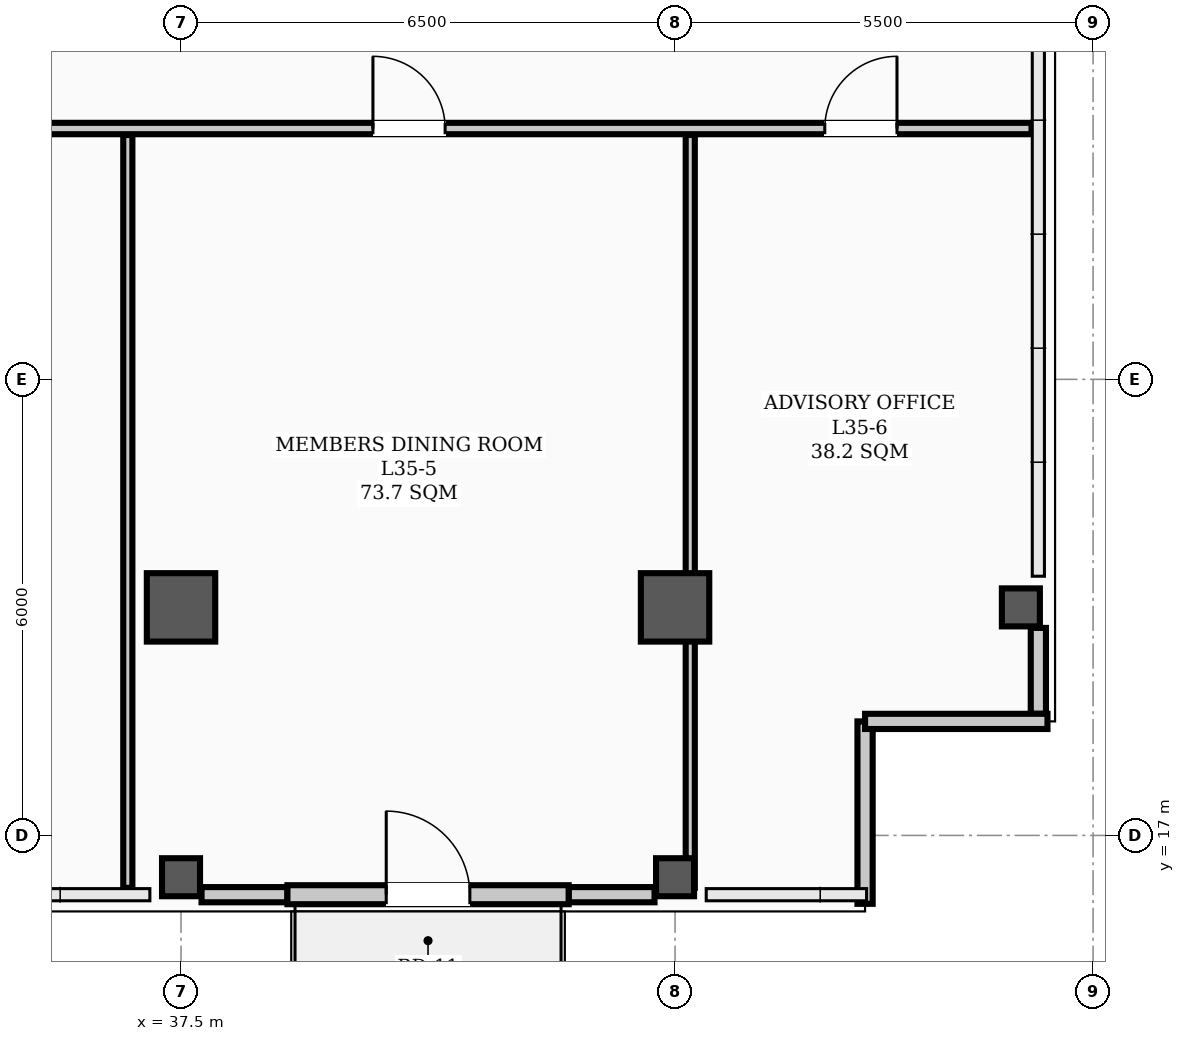
"""IFC4 building model, lengths in metres.
Left out: names, types, materials, properties, quantities, classifications, styles, units other than length and angle.
Written with IfcOpenShell. Run it as: python <this file> out.ifc"""

import sys

from ifc_helpers import new_model, si_unit, direction, frame, frame_2d, origin, origin_2d, place, context, subcontext, project, spatial, rectangle, hollow_rectangle, extrude, element, fill, save


model = new_model("IFC4")
c1 = context("Model", 3, precision=1e-05, world=origin(), true_north=direction((0.0, 1.0)))
c2 = subcontext(c1, "Body", "Model", "MODEL_VIEW")
j1 = project(units=[si_unit("LENGTHUNIT", "METRE"), si_unit("PLANEANGLEUNIT", "RADIAN")], contexts=[c1])
p1 = place(None, origin())
s1 = spatial("IfcSite", under=j1, at=p1, CompositionType="ELEMENT")
p2 = place(p1, origin())
s2 = spatial("IfcBuilding", under=s1, at=p2, CompositionType="ELEMENT")
p3 = place(p2, frame((0.0, 0.0, 142.2)))
s3 = spatial("IfcBuildingStorey", under=s2, at=p3, CompositionType="ELEMENT", Elevation=142.2)
for number, where, z_axis, x_axis in (
    (1, (37.5, 20.0, 0.0), (0.0, 0.0, 1.0), (1.0, 0.0, 0.0)),
    (2, (44.0, 20.0, 0.0), (0.0, 0.0, 1.0), (1.0, 0.0, 0.0)),
):
    element("IfcColumn", number, at=place(p3, frame(where, z_axis=z_axis, x_axis=x_axis)), inside=s3, PredefinedType="COLUMN", context=c2, shape_type="SweptSolid", body=[
        extrude(hollow_rectangle(XDim=0.9, YDim=0.9, WallThickness=0.035, InnerFilletRadius=0.017, OuterFilletRadius=0.052, at=origin_2d()), origin(), (0.0, 0.0, 1.0), 3.9),
    ])
for number, where, z_axis, x_axis in (
    (3, (37.5, 16.45, 0.0), (0.0, 0.0, 1.0), (1.0, 0.0, 0.0)),
    (4, (44.0, 16.45, 0.0), (0.0, 0.0, 1.0), (1.0, 0.0, 0.0)),
    (5, (48.55, 20.0, 0.0), (0.0, 0.0, 1.0), (1.0, 0.0, 0.0)),
):
    element("IfcColumn", number, at=place(p3, frame(where, z_axis=z_axis, x_axis=x_axis)), inside=s3, PredefinedType="COLUMN", context=c2, shape_type="SweptSolid", body=[
        extrude(hollow_rectangle(XDim=0.5, YDim=0.5, WallThickness=0.024, InnerFilletRadius=0.012, OuterFilletRadius=0.036, at=origin_2d()), origin(), (0.0, 0.0, 1.0), 3.9),
    ])
for number, where, z_axis, x_axis in (
    (6, (48.78, 18.6, 0.0), (0.0, 0.0, 1.0), (0.0, 1.0, 0.0)),
    (7, (37.77, 16.22, 0.0), (0.0, 0.0, 1.0), (1.0, 0.0, 0.0)),
    (8, (42.6, 16.22, 0.0), (0.0, 0.0, 1.0), (1.0, 0.0, 0.0)),
):
    element("IfcWall", number, at=place(p3, frame(where, z_axis=z_axis, x_axis=x_axis)), inside=s3, PredefinedType="PARAPET", context=c2, shape_type="SweptSolid", body=[
        extrude(rectangle(XDim=1.13, YDim=0.2, at=frame_2d((0.565, 0.0))), origin(), (0.0, 0.0, 1.0), 1.2),
    ])
for number, where, z_axis, x_axis in (
    (9, (46.5, 16.1, 0.0), (0.0, 0.0, 1.0), (0.0, 1.0, 0.0)),
    (10, (46.5, 18.5, 0.0), (0.0, 0.0, 1.0), (1.0, 0.0, 0.0)),
):
    element("IfcWall", number, at=place(p3, frame(where, z_axis=z_axis, x_axis=x_axis)), inside=s3, PredefinedType="PARAPET", context=c2, shape_type="SweptSolid", body=[
        extrude(rectangle(XDim=2.4, YDim=0.2, at=frame_2d((1.2, 0.0))), origin(), (0.0, 0.0, 1.0), 1.2),
    ])
p4 = place(p3, frame((38.9, 16.22, 0.0), z_axis=(0.0, 0.0, 1.0), x_axis=(1.0, 0.0, 0.0)))
e11 = element("IfcWall", 11, at=p4, inside=s3, PredefinedType="STANDARD", context=c2, shape_type="SweptSolid", body=[
    extrude(rectangle(XDim=3.7, YDim=0.25, at=frame_2d((1.85, 0.0))), origin(), (0.0, 0.0, 1.0), 3.18),
])
p5 = place(p4, frame((1.3, 0.0, 0.0)))
e12 = element("IfcOpeningElement", 12, at=p5, cuts=e11, PredefinedType="OPENING", context=c2, shape_type="SweptSolid", body=[
    extrude(rectangle(XDim=1.1, YDim=2.2, at=frame_2d((0.55, 1.1))), frame((0.0, 0.135, 0.0), z_axis=(0.0, -1.0, 0.0), x_axis=(1.0, 0.0, 0.0)), (0.0, 0.0, 1.0), 0.27),
])
p6 = place(p3, frame((2.31, 26.3, 0.0), z_axis=(0.0, 0.0, 1.0), x_axis=(1.0, 0.0, 0.0)))
e13 = element("IfcWall", 13, at=p6, inside=s3, PredefinedType="PARTITIONING", context=c2, shape_type="SweptSolid", body=[
    extrude(rectangle(XDim=46.38, YDim=0.15, at=frame_2d((23.19, 0.0))), origin(), (0.0, 0.0, 1.0), 3.1),
])
p7 = place(p6, frame((9.39, 0.0, 0.0)))
e14 = element("IfcOpeningElement", 14, at=p7, cuts=e13, PredefinedType="OPENING", context=c2, shape_type="SweptSolid", body=[
    extrude(rectangle(XDim=0.95, YDim=2.08, at=frame_2d((0.475, 1.04))), frame((0.0, 0.085, 0.0), z_axis=(0.0, -1.0, 0.0), x_axis=(1.0, 0.0, 0.0)), (0.0, 0.0, 1.0), 0.17),
])
p8 = place(p6, frame((14.215, 0.0, 0.0)))
e15 = element("IfcOpeningElement", 15, at=p8, cuts=e13, PredefinedType="OPENING", context=c2, shape_type="SweptSolid", body=[
    extrude(rectangle(XDim=0.95, YDim=2.08, at=frame_2d((0.475, 1.04))), frame((0.0, 0.085, 0.0), z_axis=(0.0, -1.0, 0.0), x_axis=(1.0, 0.0, 0.0)), (0.0, 0.0, 1.0), 0.17),
])
p9 = place(p6, frame((19.115, 0.0, 0.0)))
e16 = element("IfcOpeningElement", 16, at=p9, cuts=e13, PredefinedType="OPENING", context=c2, shape_type="SweptSolid", body=[
    extrude(rectangle(XDim=0.95, YDim=2.08, at=frame_2d((0.475, 1.04))), frame((0.0, 0.085, 0.0), z_axis=(0.0, -1.0, 0.0), x_axis=(1.0, 0.0, 0.0)), (0.0, 0.0, 1.0), 0.17),
])
p10 = place(p6, frame((23.065, 0.0, 0.0)))
e17 = element("IfcOpeningElement", 17, at=p10, cuts=e13, PredefinedType="OPENING", context=c2, shape_type="SweptSolid", body=[
    extrude(rectangle(XDim=0.95, YDim=2.08, at=frame_2d((0.475, 1.04))), frame((0.0, 0.085, 0.0), z_axis=(0.0, -1.0, 0.0), x_axis=(1.0, 0.0, 0.0)), (0.0, 0.0, 1.0), 0.17),
])
p11 = place(p6, frame((37.715, 0.0, 0.0)))
e18 = element("IfcOpeningElement", 18, at=p11, cuts=e13, PredefinedType="OPENING", context=c2, shape_type="SweptSolid", body=[
    extrude(rectangle(XDim=0.95, YDim=2.08, at=frame_2d((0.475, 1.04))), frame((0.0, 0.085, 0.0), z_axis=(0.0, -1.0, 0.0), x_axis=(1.0, 0.0, 0.0)), (0.0, 0.0, 1.0), 0.17),
])
p12 = place(p6, frame((43.66, 0.0, 0.0)))
e19 = element("IfcOpeningElement", 19, at=p12, cuts=e13, PredefinedType="OPENING", context=c2, shape_type="SweptSolid", body=[
    extrude(rectangle(XDim=0.95, YDim=2.08, at=frame_2d((0.475, 1.04))), frame((0.0, 0.085, 0.0), z_axis=(0.0, -1.0, 0.0), x_axis=(1.0, 0.0, 0.0)), (0.0, 0.0, 1.0), 0.17),
])
for number, where, z_axis, x_axis in (
    (20, (36.8, 16.31, 0.0), (0.0, 0.0, 1.0), (0.0, 1.0, 0.0)),
    (21, (44.2, 16.31, 0.0), (0.0, 0.0, 1.0), (0.0, 1.0, 0.0)),
):
    element("IfcWall", number, at=place(p3, frame(where, z_axis=z_axis, x_axis=x_axis)), inside=s3, PredefinedType="PARTITIONING", context=c2, shape_type="SweptSolid", body=[
        extrude(rectangle(XDim=9.905, YDim=0.12, at=frame_2d((4.953, 0.0))), origin(), (0.0, 0.0, 1.0), 3.0),
    ])
p13 = place(p5, origin())
e22 = element("IfcDoor", 22, at=p13, inside=s3, OperationType="SINGLE_SWING_LEFT", PredefinedType="DOOR", context=c2, shape_type="SweptSolid", body=[
    extrude(rectangle(XDim=1.1, YDim=2.2, at=frame_2d((0.55, 1.1))), frame((0.0, 0.025, 0.0), z_axis=(0.0, -1.0, 0.0), x_axis=(1.0, 0.0, 0.0)), (0.0, 0.0, 1.0), 0.05),
])
fill(e12, e22)
p14 = place(p11, origin())
e23 = element("IfcDoor", 23, at=p14, inside=s3, OperationType="SINGLE_SWING_LEFT", PredefinedType="DOOR", context=c2, shape_type="SweptSolid", body=[
    extrude(rectangle(XDim=0.95, YDim=2.08, at=frame_2d((0.475, 1.04))), frame((0.0, 0.025, 0.0), z_axis=(0.0, -1.0, 0.0), x_axis=(1.0, 0.0, 0.0)), (0.0, 0.0, 1.0), 0.05),
])
fill(e18, e23)
p15 = place(p12, origin())
e24 = element("IfcDoor", 24, at=p15, inside=s3, OperationType="SINGLE_SWING_RIGHT", PredefinedType="DOOR", context=c2, shape_type="SweptSolid", body=[
    extrude(rectangle(XDim=0.95, YDim=2.08, at=frame_2d((0.475, 1.04))), frame((0.0, 0.025, 0.0), z_axis=(0.0, -1.0, 0.0), x_axis=(1.0, 0.0, 0.0)), (0.0, 0.0, 1.0), 0.05),
])
fill(e19, e24)
save(model, sys.argv[1])
